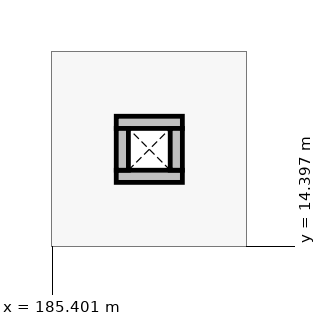
"""IFC4 building model, lengths in metres.
Left out: names, types, materials, properties, quantities, classifications, styles, units other than length and angle.
Written with IfcOpenShell. Run it as: python <this file> out.ifc"""

import sys

from ifc_helpers import new_model, si_unit, direction, frame, frame_2d, origin, place, context, subcontext, project, spatial, rectangle, extrude, element, save


model = new_model("IFC4")
c1 = context("Model", 3, precision=1e-05, world=origin(), true_north=direction((0.0, 1.0)))
c2 = subcontext(c1, "Body", "Model", "MODEL_VIEW")
j1 = project(units=[si_unit("LENGTHUNIT", "METRE"), si_unit("PLANEANGLEUNIT", "RADIAN")], contexts=[c1])
p1 = place(None, origin())
s1 = spatial("IfcSite", under=j1, at=p1, CompositionType="ELEMENT")
p2 = place(p1, origin())
s2 = spatial("IfcBuilding", under=s1, at=p2, CompositionType="ELEMENT")
p3 = place(p2, frame((0.0, 0.0, 8.4)))
s3 = spatial("IfcBuildingStorey", under=s2, at=p3, CompositionType="ELEMENT", Elevation=8.4)
for number, where, z_axis, x_axis in (
    (1, (186.24, 15.32, 0.0), (0.0, 0.0, 1.0), (1.0, 0.0, 0.0)),
    (2, (186.24, 16.03, 0.0), (0.0, 0.0, 1.0), (1.0, 0.0, 0.0)),
):
    element("IfcWall", number, at=place(p3, frame(where, z_axis=z_axis, x_axis=x_axis)), inside=s3, PredefinedType="PARTITIONING", context=c2, shape_type="SweptSolid", body=[
        extrude(rectangle(XDim=0.87, YDim=0.16, at=frame_2d((0.435, 0.0))), origin(), (0.0, 0.0, 1.0), 3.35),
    ])
for number, where, z_axis, x_axis in (
    (3, (186.32, 15.4, 0.0), (0.0, 0.0, 1.0), (0.0, 1.0, 0.0)),
    (4, (187.03, 15.4, 0.0), (0.0, 0.0, 1.0), (0.0, 1.0, 0.0)),
):
    element("IfcWall", number, at=place(p3, frame(where, z_axis=z_axis, x_axis=x_axis)), inside=s3, PredefinedType="PARTITIONING", context=c2, shape_type="SweptSolid", body=[
        extrude(rectangle(XDim=0.55, YDim=0.16, at=frame_2d((0.275, 0.0))), origin(), (0.0, 0.0, 1.0), 3.35),
    ])
save(model, sys.argv[1])
